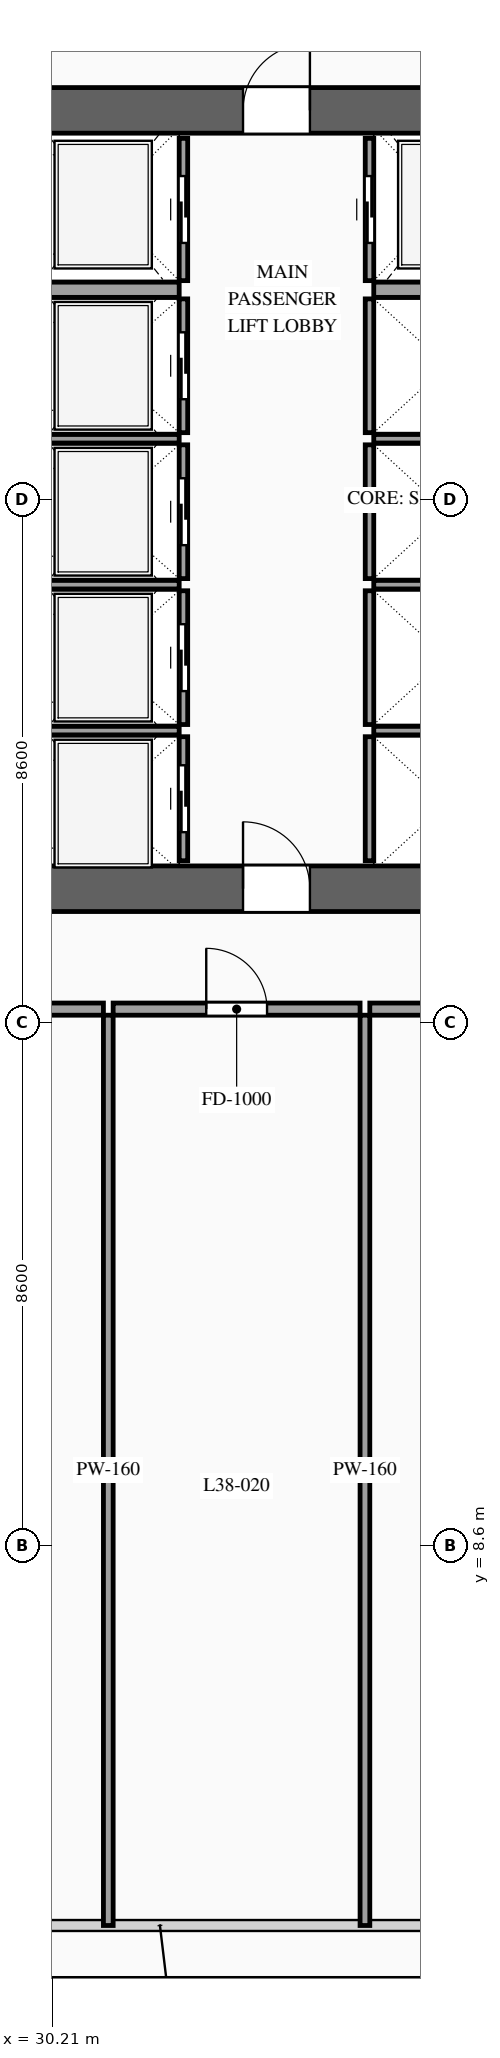
"""IFC4 building model, lengths in metres.
Left out: names, types, materials, properties, quantities, classifications, styles, units other than length and angle.
Written with IfcOpenShell. Run it as: python <this file> out.ifc"""

import sys

from ifc_helpers import new_model, si_unit, direction, frame, frame_2d, origin, place, context, subcontext, project, spatial, rectangle, extrude, source, transform, mapped, element, fill, save


model = new_model("IFC4")
c1 = context("Model", 3, precision=1e-05, world=origin(), true_north=direction((0.0, 1.0)))
c2 = subcontext(c1, "Body", "Model", "MODEL_VIEW")
j1 = project(units=[si_unit("LENGTHUNIT", "METRE"), si_unit("PLANEANGLEUNIT", "RADIAN")], contexts=[c1])
p1 = place(None, origin())
s1 = spatial("IfcSite", under=j1, at=p1, CompositionType="ELEMENT")
p2 = place(p1, origin())
s2 = spatial("IfcBuilding", under=s1, at=p2, CompositionType="ELEMENT")
p3 = place(p2, frame((0.0, 0.0, 145.2)))
s3 = spatial("IfcBuildingStorey", under=s2, at=p3, CompositionType="ELEMENT", Elevation=145.2)
p4 = place(p3, frame((23.425, 19.4, 0.0), z_axis=(0.0, 0.0, 1.0), x_axis=(1.0, 0.0, 0.0)))
e1 = element("IfcWall", 1, at=p4, inside=s3, PredefinedType="SHEAR", context=c2, shape_type="SweptSolid", body=[
    extrude(rectangle(XDim=27.15, YDim=0.75, at=frame_2d((13.575, 0.0))), origin(), (0.0, 0.0, 1.0), 3.6),
])
p5 = place(p4, frame((2.025, 0.0, 0.0)))
e2 = element("IfcOpeningElement", 2, at=p5, cuts=e1, PredefinedType="OPENING", context=c2, shape_type="SweptSolid", body=[
    extrude(rectangle(XDim=1.1, YDim=2.2, at=frame_2d((0.55, 1.1))), frame((0.0, 0.39, 0.0), z_axis=(0.0, -1.0, 0.0), x_axis=(1.0, 0.0, 0.0)), (0.0, 0.0, 1.0), 0.78),
])
p6 = place(p4, frame((9.925, 0.0, 0.0)))
e3 = element("IfcOpeningElement", 3, at=p6, cuts=e1, PredefinedType="OPENING", context=c2, shape_type="SweptSolid", body=[
    extrude(rectangle(XDim=1.1, YDim=2.2, at=frame_2d((0.55, 1.1))), frame((0.0, 0.39, 0.0), z_axis=(0.0, -1.0, 0.0), x_axis=(1.0, 0.0, 0.0)), (0.0, 0.0, 1.0), 0.78),
])
p7 = place(p4, frame((23.125, 0.0, 0.0)))
e4 = element("IfcOpeningElement", 4, at=p7, cuts=e1, PredefinedType="OPENING", context=c2, shape_type="SweptSolid", body=[
    extrude(rectangle(XDim=1.1, YDim=2.2, at=frame_2d((0.55, 1.1))), frame((0.0, 0.39, 0.0), z_axis=(0.0, -1.0, 0.0), x_axis=(1.0, 0.0, 0.0)), (0.0, 0.0, 1.0), 0.78),
])
p8 = place(p4, frame((19.745, 0.0, 0.0)))
e5 = element("IfcOpeningElement", 5, at=p8, cuts=e1, PredefinedType="OPENING", context=c2, shape_type="SweptSolid", body=[
    extrude(rectangle(XDim=0.9, YDim=2.15, at=frame_2d((0.45, 1.075))), frame((0.0, 0.39, 0.0), z_axis=(0.0, -1.0, 0.0), x_axis=(1.0, 0.0, 0.0)), (0.0, 0.0, 1.0), 0.78),
])
p9 = place(p4, frame((18.305, 0.0, 0.0)))
e6 = element("IfcOpeningElement", 6, at=p9, cuts=e1, PredefinedType="OPENING", context=c2, shape_type="SweptSolid", body=[
    extrude(rectangle(XDim=0.9, YDim=2.15, at=frame_2d((0.45, 1.075))), frame((0.0, 0.39, 0.0), z_axis=(0.0, -1.0, 0.0), x_axis=(1.0, 0.0, 0.0)), (0.0, 0.0, 1.0), 0.78),
])
p10 = place(p3, frame((23.425, 32.2, 0.0), z_axis=(0.0, 0.0, 1.0), x_axis=(1.0, 0.0, 0.0)))
e7 = element("IfcWall", 7, at=p10, inside=s3, PredefinedType="SHEAR", context=c2, shape_type="SweptSolid", body=[
    extrude(rectangle(XDim=27.15, YDim=0.75, at=frame_2d((13.575, 0.0))), origin(), (0.0, 0.0, 1.0), 3.6),
])
p11 = place(p10, frame((4.645, 0.0, 0.0)))
e8 = element("IfcOpeningElement", 8, at=p11, cuts=e7, PredefinedType="OPENING", context=c2, shape_type="SweptSolid", body=[
    extrude(rectangle(XDim=0.9, YDim=2.15, at=frame_2d((0.45, 1.075))), frame((0.0, 0.39, 0.0), z_axis=(0.0, -1.0, 0.0), x_axis=(1.0, 0.0, 0.0)), (0.0, 0.0, 1.0), 0.78),
])
p12 = place(p10, frame((9.925, 0.0, 0.0)))
e9 = element("IfcOpeningElement", 9, at=p12, cuts=e7, PredefinedType="OPENING", context=c2, shape_type="SweptSolid", body=[
    extrude(rectangle(XDim=1.1, YDim=2.2, at=frame_2d((0.55, 1.1))), frame((0.0, 0.39, 0.0), z_axis=(0.0, -1.0, 0.0), x_axis=(1.0, 0.0, 0.0)), (0.0, 0.0, 1.0), 0.78),
])
p13 = place(p10, frame((15.775, 0.0, 0.0)))
e10 = element("IfcOpeningElement", 10, at=p13, cuts=e7, PredefinedType="OPENING", context=c2, shape_type="SweptSolid", body=[
    extrude(rectangle(XDim=1.1, YDim=2.2, at=frame_2d((0.55, 1.1))), frame((0.0, 0.39, 0.0), z_axis=(0.0, -1.0, 0.0), x_axis=(1.0, 0.0, 0.0)), (0.0, 0.0, 1.0), 0.78),
])
p14 = place(p10, frame((19.745, 0.0, 0.0)))
e11 = element("IfcOpeningElement", 11, at=p14, cuts=e7, PredefinedType="OPENING", context=c2, shape_type="SweptSolid", body=[
    extrude(rectangle(XDim=0.9, YDim=2.15, at=frame_2d((0.45, 1.075))), frame((0.0, 0.39, 0.0), z_axis=(0.0, -1.0, 0.0), x_axis=(1.0, 0.0, 0.0)), (0.0, 0.0, 1.0), 0.78),
])
p15 = place(p3, frame((32.37, 19.86, 0.0), z_axis=(0.0, 0.0, 1.0), x_axis=(0.0, 1.0, 0.0)))
e12 = element("IfcWall", 12, at=p15, inside=s3, PredefinedType="SOLIDWALL", context=c2, shape_type="SweptSolid", body=[
    extrude(rectangle(XDim=2.04, YDim=0.14, at=frame_2d((1.02, 0.0))), origin(), (0.0, 0.0, 1.0), 3.38),
])
p16 = place(p15, frame((0.47, 0.0, 0.0)))
e13 = element("IfcOpeningElement", 13, at=p16, cuts=e12, PredefinedType="OPENING", context=c2, shape_type="SweptSolid", body=[
    extrude(rectangle(XDim=1.1, YDim=2.2, at=frame_2d((0.55, 1.1))), frame((0.0, 0.085, 0.0), z_axis=(0.0, -1.0, 0.0), x_axis=(1.0, 0.0, 0.0)), (0.0, 0.0, 1.0), 0.17),
])
m1 = source(origin(), c2, "Body", "SweptSolid", [
    extrude(rectangle(XDim=2.5, YDim=0.14, at=frame_2d((1.25, 0.0))), origin(), (0.0, 0.0, 1.0), 3.38),
])
p17 = place(p3, frame((29.8, 22.0, 0.0), z_axis=(0.0, 0.0, 1.0), x_axis=(1.0, 0.0, 0.0)))
e14 = element("IfcWall", 14, at=p17, inside=s3, PredefinedType="SOLIDWALL", context=c2, shape_type="MappedRepresentation", body=[
    mapped(m1, transform((0.0, 0.0, 0.0), scale=1.0)),
])
p18 = place(p3, frame((32.37, 22.1, 0.0), z_axis=(0.0, 0.0, 1.0), x_axis=(0.0, 1.0, 0.0)))
e15 = element("IfcWall", 15, at=p18, inside=s3, PredefinedType="SOLIDWALL", context=c2, shape_type="SweptSolid", body=[
    extrude(rectangle(XDim=2.2, YDim=0.14, at=frame_2d((1.1, 0.0))), origin(), (0.0, 0.0, 1.0), 3.38),
])
p19 = place(p18, frame((0.55, 0.0, 0.0)))
e16 = element("IfcOpeningElement", 16, at=p19, cuts=e15, PredefinedType="OPENING", context=c2, shape_type="SweptSolid", body=[
    extrude(rectangle(XDim=1.1, YDim=2.2, at=frame_2d((0.55, 1.1))), frame((0.0, 0.085, 0.0), z_axis=(0.0, -1.0, 0.0), x_axis=(1.0, 0.0, 0.0)), (0.0, 0.0, 1.0), 0.17),
])
p20 = place(p3, frame((29.8, 24.4, 0.0), z_axis=(0.0, 0.0, 1.0), x_axis=(1.0, 0.0, 0.0)))
e17 = element("IfcWall", 17, at=p20, inside=s3, PredefinedType="SOLIDWALL", context=c2, shape_type="MappedRepresentation", body=[
    mapped(m1, transform((0.0, 0.0, 0.0), scale=1.0)),
])
p21 = place(p3, frame((32.37, 24.5, 0.0), z_axis=(0.0, 0.0, 1.0), x_axis=(0.0, 1.0, 0.0)))
e18 = element("IfcWall", 18, at=p21, inside=s3, PredefinedType="SOLIDWALL", context=c2, shape_type="SweptSolid", body=[
    extrude(rectangle(XDim=2.2, YDim=0.14, at=frame_2d((1.1, 0.0))), origin(), (0.0, 0.0, 1.0), 3.38),
])
p22 = place(p21, frame((0.55, 0.0, 0.0)))
e19 = element("IfcOpeningElement", 19, at=p22, cuts=e18, PredefinedType="OPENING", context=c2, shape_type="SweptSolid", body=[
    extrude(rectangle(XDim=1.1, YDim=2.2, at=frame_2d((0.55, 1.1))), frame((0.0, 0.085, 0.0), z_axis=(0.0, -1.0, 0.0), x_axis=(1.0, 0.0, 0.0)), (0.0, 0.0, 1.0), 0.17),
])
p23 = place(p3, frame((29.8, 26.8, 0.0), z_axis=(0.0, 0.0, 1.0), x_axis=(1.0, 0.0, 0.0)))
e20 = element("IfcWall", 20, at=p23, inside=s3, PredefinedType="SOLIDWALL", context=c2, shape_type="MappedRepresentation", body=[
    mapped(m1, transform((0.0, 0.0, 0.0), scale=1.0)),
])
p24 = place(p3, frame((32.37, 26.9, 0.0), z_axis=(0.0, 0.0, 1.0), x_axis=(0.0, 1.0, 0.0)))
e21 = element("IfcWall", 21, at=p24, inside=s3, PredefinedType="SOLIDWALL", context=c2, shape_type="SweptSolid", body=[
    extrude(rectangle(XDim=2.2, YDim=0.14, at=frame_2d((1.1, 0.0))), origin(), (0.0, 0.0, 1.0), 3.38),
])
p25 = place(p24, frame((0.55, 0.0, 0.0)))
e22 = element("IfcOpeningElement", 22, at=p25, cuts=e21, PredefinedType="OPENING", context=c2, shape_type="SweptSolid", body=[
    extrude(rectangle(XDim=1.1, YDim=2.2, at=frame_2d((0.55, 1.1))), frame((0.0, 0.085, 0.0), z_axis=(0.0, -1.0, 0.0), x_axis=(1.0, 0.0, 0.0)), (0.0, 0.0, 1.0), 0.17),
])
p26 = place(p3, frame((32.37, 29.4, 0.0), z_axis=(0.0, 0.0, 1.0), x_axis=(0.0, 1.0, 0.0)))
e23 = element("IfcWall", 23, at=p26, inside=s3, PredefinedType="SOLIDWALL", context=c2, shape_type="SweptSolid", body=[
    extrude(rectangle(XDim=2.34, YDim=0.14, at=frame_2d((1.17, 0.0))), origin(), (0.0, 0.0, 1.0), 3.38),
])
p27 = place(p26, frame((0.62, 0.0, 0.0)))
e24 = element("IfcOpeningElement", 24, at=p27, cuts=e23, PredefinedType="OPENING", context=c2, shape_type="SweptSolid", body=[
    extrude(rectangle(XDim=1.1, YDim=2.2, at=frame_2d((0.55, 1.1))), frame((0.0, 0.085, 0.0), z_axis=(0.0, -1.0, 0.0), x_axis=(1.0, 0.0, 0.0)), (0.0, 0.0, 1.0), 0.17),
])
m2 = source(origin(), c2, "Body", "SweptSolid", [
    extrude(rectangle(XDim=2.5, YDim=0.25, at=frame_2d((1.25, 0.0))), origin(), (0.0, 0.0, 1.0), 3.38),
])
p28 = place(p3, frame((29.8, 29.25, 0.0), z_axis=(0.0, 0.0, 1.0), x_axis=(1.0, 0.0, 0.0)))
e25 = element("IfcWall", 25, at=p28, inside=s3, PredefinedType="SOLIDWALL", context=c2, shape_type="MappedRepresentation", body=[
    mapped(m2, transform((0.0, 0.0, 0.0), scale=1.0)),
])
m3 = source(origin(), c2, "Body", "SweptSolid", [
    extrude(rectangle(XDim=2.04, YDim=0.14, at=frame_2d((1.02, 0.0))), origin(), (0.0, 0.0, 1.0), 3.38),
])
p29 = place(p3, frame((35.43, 19.86, 0.0), z_axis=(0.0, 0.0, 1.0), x_axis=(0.0, 1.0, 0.0)))
e26 = element("IfcWall", 26, at=p29, inside=s3, PredefinedType="SOLIDWALL", context=c2, shape_type="MappedRepresentation", body=[
    mapped(m3, transform((0.0, 0.0, 0.0), scale=1.0)),
])
m4 = source(origin(), c2, "Body", "SweptSolid", [
    extrude(rectangle(XDim=2.4, YDim=0.14, at=frame_2d((1.2, 0.0))), origin(), (0.0, 0.0, 1.0), 3.38),
])
p30 = place(p3, frame((35.5, 22.0, 0.0), z_axis=(0.0, 0.0, 1.0), x_axis=(1.0, 0.0, 0.0)))
e27 = element("IfcWall", 27, at=p30, inside=s3, PredefinedType="SOLIDWALL", context=c2, shape_type="MappedRepresentation", body=[
    mapped(m4, transform((0.0, 0.0, 0.0), scale=1.0)),
])
m5 = source(origin(), c2, "Body", "SweptSolid", [
    extrude(rectangle(XDim=2.2, YDim=0.14, at=frame_2d((1.1, 0.0))), origin(), (0.0, 0.0, 1.0), 3.38),
])
p31 = place(p3, frame((35.43, 22.1, 0.0), z_axis=(0.0, 0.0, 1.0), x_axis=(0.0, 1.0, 0.0)))
e28 = element("IfcWall", 28, at=p31, inside=s3, PredefinedType="SOLIDWALL", context=c2, shape_type="MappedRepresentation", body=[
    mapped(m5, transform((0.0, 0.0, 0.0), scale=1.0)),
])
p32 = place(p3, frame((35.5, 24.4, 0.0), z_axis=(0.0, 0.0, 1.0), x_axis=(1.0, 0.0, 0.0)))
e29 = element("IfcWall", 29, at=p32, inside=s3, PredefinedType="SOLIDWALL", context=c2, shape_type="MappedRepresentation", body=[
    mapped(m4, transform((0.0, 0.0, 0.0), scale=1.0)),
])
p33 = place(p3, frame((35.43, 24.5, 0.0), z_axis=(0.0, 0.0, 1.0), x_axis=(0.0, 1.0, 0.0)))
e30 = element("IfcWall", 30, at=p33, inside=s3, PredefinedType="SOLIDWALL", context=c2, shape_type="MappedRepresentation", body=[
    mapped(m5, transform((0.0, 0.0, 0.0), scale=1.0)),
])
p34 = place(p3, frame((35.5, 26.8, 0.0), z_axis=(0.0, 0.0, 1.0), x_axis=(1.0, 0.0, 0.0)))
e31 = element("IfcWall", 31, at=p34, inside=s3, PredefinedType="SOLIDWALL", context=c2, shape_type="MappedRepresentation", body=[
    mapped(m4, transform((0.0, 0.0, 0.0), scale=1.0)),
])
m6 = source(origin(), c2, "Body", "SweptSolid", [
    extrude(rectangle(XDim=2.2, YDim=0.14, at=frame_2d((1.1, 0.0))), origin(), (0.0, 0.0, 1.0), 3.38),
])
p35 = place(p3, frame((35.43, 26.9, 0.0), z_axis=(0.0, 0.0, 1.0), x_axis=(0.0, 1.0, 0.0)))
e32 = element("IfcWall", 32, at=p35, inside=s3, PredefinedType="SOLIDWALL", context=c2, shape_type="MappedRepresentation", body=[
    mapped(m6, transform((0.0, 0.0, 0.0), scale=1.0)),
])
p36 = place(p3, frame((35.43, 29.4, 0.0), z_axis=(0.0, 0.0, 1.0), x_axis=(0.0, 1.0, 0.0)))
e33 = element("IfcWall", 33, at=p36, inside=s3, PredefinedType="SOLIDWALL", context=c2, shape_type="SweptSolid", body=[
    extrude(rectangle(XDim=2.34, YDim=0.14, at=frame_2d((1.17, 0.0))), origin(), (0.0, 0.0, 1.0), 3.38),
])
p37 = place(p36, frame((0.62, 0.0, 0.0)))
e34 = element("IfcOpeningElement", 34, at=p37, cuts=e33, PredefinedType="OPENING", context=c2, shape_type="SweptSolid", body=[
    extrude(rectangle(XDim=1.1, YDim=2.2, at=frame_2d((0.55, 1.1))), frame((0.0, 0.085, 0.0), z_axis=(0.0, -1.0, 0.0), x_axis=(1.0, 0.0, 0.0)), (0.0, 0.0, 1.0), 0.17),
])
m7 = source(origin(), c2, "Body", "SweptSolid", [
    extrude(rectangle(XDim=2.4, YDim=0.25, at=frame_2d((1.2, 0.0))), origin(), (0.0, 0.0, 1.0), 3.38),
])
p38 = place(p3, frame((35.5, 29.25, 0.0), z_axis=(0.0, 0.0, 1.0), x_axis=(1.0, 0.0, 0.0)))
e35 = element("IfcWall", 35, at=p38, inside=s3, PredefinedType="SOLIDWALL", context=c2, shape_type="MappedRepresentation", body=[
    mapped(m7, transform((0.0, 0.0, 0.0), scale=1.0)),
])
p39 = place(p3, frame((22.277, 17.42, 0.0), z_axis=(0.0, 0.0, 1.0), x_axis=(1.0, 0.0, 0.0)))
e36 = element("IfcWall", 36, at=p39, inside=s3, PredefinedType="PARTITIONING", context=c2, shape_type="SweptSolid", body=[
    extrude(rectangle(XDim=8.777, YDim=0.2, at=frame_2d((4.388, 0.0))), origin(), (0.0, 0.0, 1.0), 3.38),
])
p40 = place(p39, frame((3.889, 0.0, 0.0)))
e37 = element("IfcOpeningElement", 37, at=p40, cuts=e36, PredefinedType="OPENING", context=c2, shape_type="SweptSolid", body=[
    extrude(rectangle(XDim=1.0, YDim=2.2, at=frame_2d((0.5, 1.1))), frame((0.0, 0.115, 0.0), z_axis=(0.0, -1.0, 0.0), x_axis=(1.0, 0.0, 0.0)), (0.0, 0.0, 1.0), 0.23),
])
m8 = source(origin(), c2, "Body", "SweptSolid", [
    extrude(rectangle(XDim=14.97, YDim=0.16, at=frame_2d((7.485, 0.0))), origin(), (0.0, 0.0, 1.0), 3.38),
])
p41 = place(p3, frame((31.134, 2.35, 0.0), z_axis=(0.0, 0.0, 1.0), x_axis=(0.0, 1.0, 0.0)))
e38 = element("IfcWall", 38, at=p41, inside=s3, PredefinedType="PARTITIONING", context=c2, shape_type="MappedRepresentation", body=[
    mapped(m8, transform((0.0, 0.0, 0.0), scale=1.0)),
])
p42 = place(p3, frame((31.214, 17.42, 0.0), z_axis=(0.0, 0.0, 1.0), x_axis=(1.0, 0.0, 0.0)))
e39 = element("IfcWall", 39, at=p42, inside=s3, PredefinedType="PARTITIONING", context=c2, shape_type="SweptSolid", body=[
    extrude(rectangle(XDim=4.061, YDim=0.2, at=frame_2d((2.03, 0.0))), origin(), (0.0, 0.0, 1.0), 3.38),
])
p43 = place(p42, frame((1.531, 0.0, 0.0)))
e40 = element("IfcOpeningElement", 40, at=p43, cuts=e39, PredefinedType="OPENING", context=c2, shape_type="SweptSolid", body=[
    extrude(rectangle(XDim=1.0, YDim=2.2, at=frame_2d((0.5, 1.1))), frame((0.0, 0.115, 0.0), z_axis=(0.0, -1.0, 0.0), x_axis=(1.0, 0.0, 0.0)), (0.0, 0.0, 1.0), 0.23),
])
p44 = place(p3, frame((35.355, 2.35, 0.0), z_axis=(0.0, 0.0, 1.0), x_axis=(0.0, 1.0, 0.0)))
e41 = element("IfcWall", 41, at=p44, inside=s3, PredefinedType="PARTITIONING", context=c2, shape_type="MappedRepresentation", body=[
    mapped(m8, transform((0.0, 0.0, 0.0), scale=1.0)),
])
p45 = place(p3, frame((35.435, 17.42, 0.0), z_axis=(0.0, 0.0, 1.0), x_axis=(1.0, 0.0, 0.0)))
e42 = element("IfcWall", 42, at=p45, inside=s3, PredefinedType="PARTITIONING", context=c2, shape_type="SweptSolid", body=[
    extrude(rectangle(XDim=9.325, YDim=0.2, at=frame_2d((4.663, 0.0))), origin(), (0.0, 0.0, 1.0), 3.38),
])
p46 = place(p45, frame((4.162, 0.0, 0.0)))
e43 = element("IfcOpeningElement", 43, at=p46, cuts=e42, PredefinedType="OPENING", context=c2, shape_type="SweptSolid", body=[
    extrude(rectangle(XDim=1.0, YDim=2.2, at=frame_2d((0.5, 1.1))), frame((0.0, 0.115, 0.0), z_axis=(0.0, -1.0, 0.0), x_axis=(1.0, 0.0, 0.0)), (0.0, 0.0, 1.0), 0.23),
])
m9 = source(origin(), c2, "Body", "SweptSolid", [
    extrude(rectangle(XDim=1.1, YDim=2.2, at=frame_2d((0.55, 1.1))), frame((0.0, 0.025, 0.0), z_axis=(0.0, -1.0, 0.0), x_axis=(1.0, 0.0, 0.0)), (0.0, 0.0, 1.0), 0.05),
])
p47 = place(p16, origin())
e44 = element("IfcDoor", 44, at=p47, inside=s3, OperationType="SLIDING_TO_LEFT", PredefinedType="DOOR", context=c2, shape_type="MappedRepresentation", body=[
    mapped(m9, transform((0.0, 0.0, 0.0), scale=1.0)),
])
fill(e13, e44)
p48 = place(p19, origin())
e45 = element("IfcDoor", 45, at=p48, inside=s3, OperationType="SLIDING_TO_RIGHT", PredefinedType="DOOR", context=c2, shape_type="MappedRepresentation", body=[
    mapped(m9, transform((0.0, 0.0, 0.0), scale=1.0)),
])
fill(e16, e45)
p49 = place(p22, origin())
e46 = element("IfcDoor", 46, at=p49, inside=s3, OperationType="SLIDING_TO_LEFT", PredefinedType="DOOR", context=c2, shape_type="MappedRepresentation", body=[
    mapped(m9, transform((0.0, 0.0, 0.0), scale=1.0)),
])
fill(e19, e46)
p50 = place(p25, origin())
e47 = element("IfcDoor", 47, at=p50, inside=s3, OperationType="SLIDING_TO_RIGHT", PredefinedType="DOOR", context=c2, shape_type="MappedRepresentation", body=[
    mapped(m9, transform((0.0, 0.0, 0.0), scale=1.0)),
])
fill(e22, e47)
p51 = place(p27, origin())
e48 = element("IfcDoor", 48, at=p51, inside=s3, OperationType="SLIDING_TO_LEFT", PredefinedType="DOOR", context=c2, shape_type="MappedRepresentation", body=[
    mapped(m9, transform((0.0, 0.0, 0.0), scale=1.0)),
])
fill(e24, e48)
p52 = place(p37, origin())
e49 = element("IfcDoor", 49, at=p52, inside=s3, OperationType="SLIDING_TO_RIGHT", PredefinedType="DOOR", context=c2, shape_type="MappedRepresentation", body=[
    mapped(m9, transform((0.0, 0.0, 0.0), scale=1.0)),
])
fill(e34, e49)
m10 = source(origin(), c2, "Body", "SweptSolid", [
    extrude(rectangle(XDim=1.1, YDim=2.2, at=frame_2d((0.55, 1.1))), frame((0.0, 0.025, 0.0), z_axis=(0.0, -1.0, 0.0), x_axis=(1.0, 0.0, 0.0)), (0.0, 0.0, 1.0), 0.05),
])
p53 = place(p6, origin())
e50 = element("IfcDoor", 50, at=p53, inside=s3, OperationType="SINGLE_SWING_LEFT", PredefinedType="DOOR", context=c2, shape_type="MappedRepresentation", body=[
    mapped(m10, transform((0.0, 0.0, 0.0), scale=1.0)),
])
fill(e3, e50)
p54 = place(p12, origin())
e51 = element("IfcDoor", 51, at=p54, inside=s3, OperationType="SINGLE_SWING_RIGHT", PredefinedType="DOOR", context=c2, shape_type="MappedRepresentation", body=[
    mapped(m10, transform((0.0, 0.0, 0.0), scale=1.0)),
])
fill(e9, e51)
m11 = source(origin(), c2, "Body", "SweptSolid", [
    extrude(rectangle(XDim=1.0, YDim=2.2, at=frame_2d((0.5, 1.1))), frame((0.0, 0.025, 0.0), z_axis=(0.0, -1.0, 0.0), x_axis=(1.0, 0.0, 0.0)), (0.0, 0.0, 1.0), 0.05),
])
p55 = place(p43, origin())
e52 = element("IfcDoor", 52, at=p55, inside=s3, OperationType="SINGLE_SWING_LEFT", PredefinedType="DOOR", context=c2, shape_type="MappedRepresentation", body=[
    mapped(m11, transform((0.0, 0.0, 0.0), scale=1.0)),
])
fill(e40, e52)
save(model, sys.argv[1])
